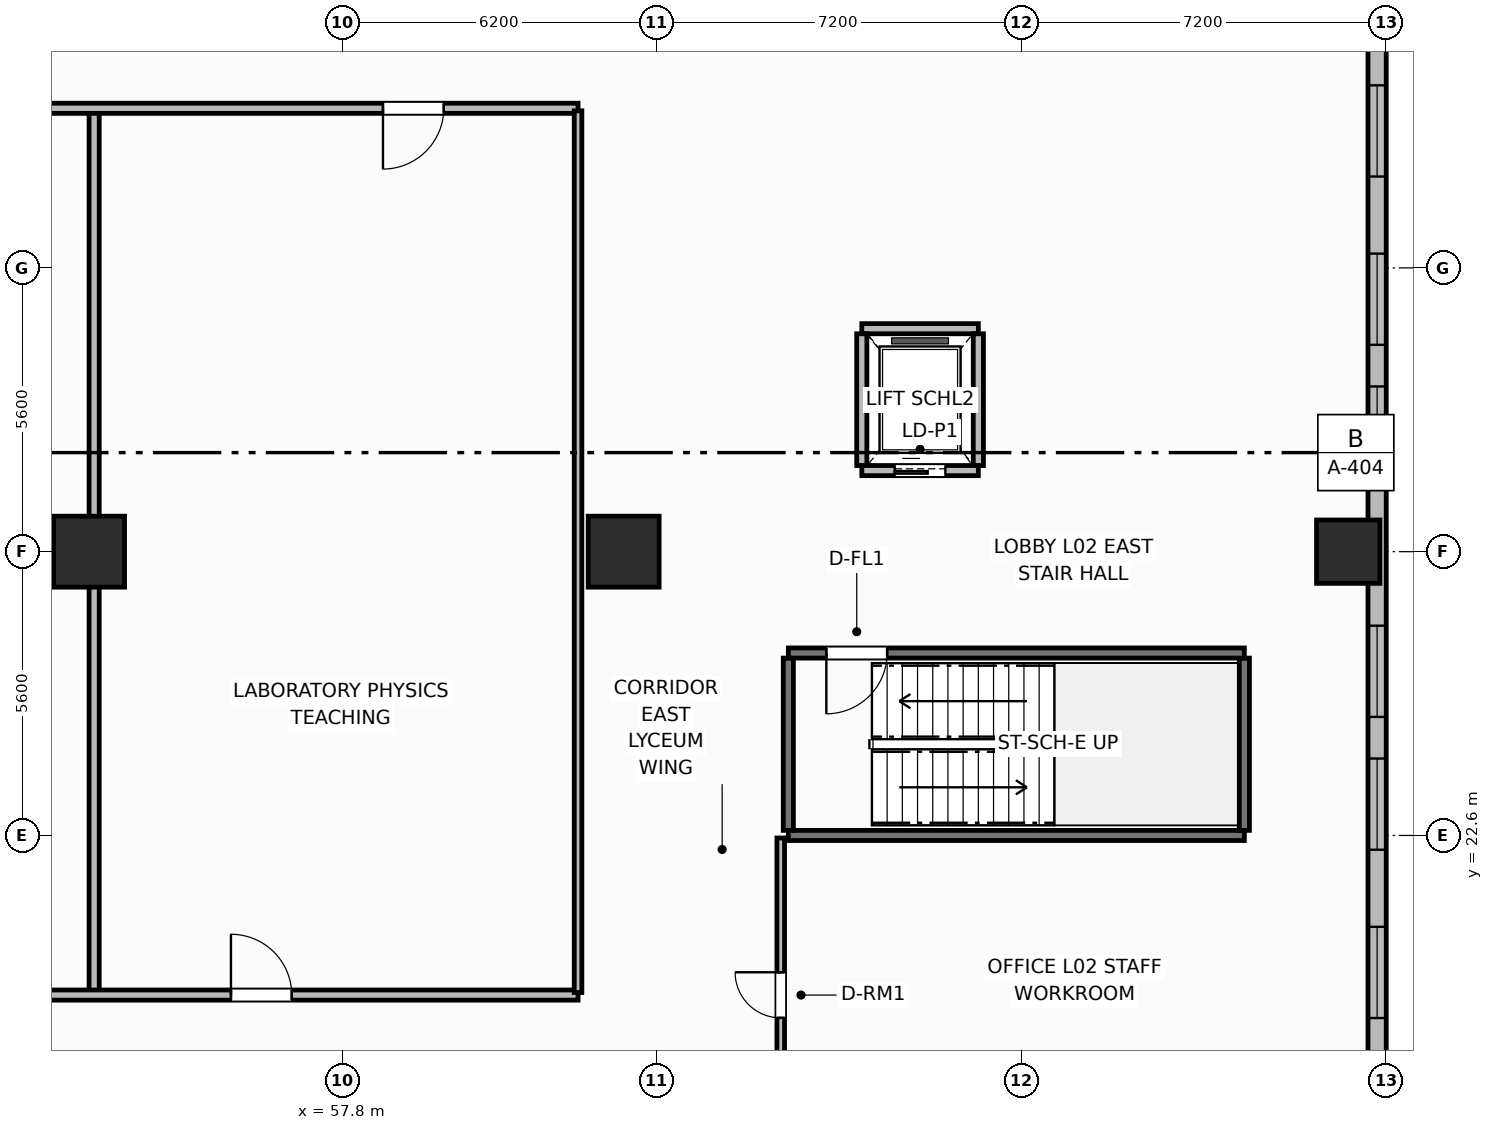
"""IFC4 building model, lengths in metres.
Left out: names, types, materials, properties, quantities, classifications, styles, units other than length and angle.
Written with IfcOpenShell. Run it as: python <this file> out.ifc"""

import sys

from ifc_helpers import new_model, si_unit, direction, frame, frame_2d, origin, origin_2d, place, context, subcontext, project, spatial, rectangle, extrude, element, fill, save


model = new_model("IFC4")
c1 = context("Model", 3, precision=1e-05, world=origin(), true_north=direction((0.0, 1.0)))
c2 = subcontext(c1, "Body", "Model", "MODEL_VIEW")
j1 = project(units=[si_unit("LENGTHUNIT", "METRE"), si_unit("PLANEANGLEUNIT", "RADIAN")], contexts=[c1])
p1 = place(None, origin())
s1 = spatial("IfcSite", under=j1, at=p1, CompositionType="ELEMENT")
p2 = place(p1, origin())
s2 = spatial("IfcBuilding", under=s1, at=p2, CompositionType="ELEMENT")
p3 = place(p2, frame((0.0, 0.0, 11.1)))
s3 = spatial("IfcBuildingStorey", under=s2, at=p3, CompositionType="ELEMENT", Elevation=11.1)
p4 = place(p3, frame((52.8, 28.2, 0.0), z_axis=(0.0, 0.0, 1.0), x_axis=(1.0, 0.0, 0.0)))
e1 = element("IfcColumn", 1, at=p4, inside=s3, PredefinedType="COLUMN", context=c2, shape_type="SweptSolid", body=[
    extrude(rectangle(XDim=1.4, YDim=1.4, at=origin_2d()), origin(), (0.0, 0.0, 1.0), 4.5),
])
p5 = place(p3, frame((77.65, 28.2, 0.0), z_axis=(0.0, 0.0, 1.0), x_axis=(1.0, 0.0, 0.0)))
e2 = element("IfcColumn", 2, at=p5, inside=s3, PredefinedType="COLUMN", context=c2, shape_type="SweptSolid", body=[
    extrude(rectangle(XDim=1.25, YDim=1.25, at=origin_2d()), origin(), (0.0, 0.0, 1.0), 4.5),
])
p6 = place(p3, frame((63.35, 28.2, 0.0), z_axis=(0.0, 0.0, 1.0), x_axis=(1.0, 0.0, 0.0)))
e3 = element("IfcColumn", 3, at=p6, inside=s3, PredefinedType="COLUMN", context=c2, shape_type="SweptSolid", body=[
    extrude(rectangle(XDim=1.4, YDim=1.4, at=origin_2d()), origin(), (0.0, 0.0, 1.0), 4.5),
])
p7 = place(p3, frame((78.22, 0.98, 0.0), z_axis=(0.0, 0.0, 1.0), x_axis=(0.0, 1.0, 0.0)))
e4 = element("IfcWall", 4, at=p7, inside=s3, PredefinedType="SOLIDWALL", context=c2, shape_type="SweptSolid", body=[
    extrude(rectangle(XDim=54.44, YDim=0.36, at=frame_2d((27.22, 0.0))), origin(), (0.0, 0.0, 1.0), 3.48),
])
p8 = place(p7, frame((1.411, 0.0, 0.9)))
e5 = element("IfcOpeningElement", 5, at=p8, cuts=e4, PredefinedType="OPENING", context=c2, shape_type="SweptSolid", body=[
    extrude(rectangle(XDim=1.8, YDim=2.1, at=frame_2d((0.9, 1.05))), frame((0.0, 0.19, 0.0), z_axis=(0.0, -1.0, 0.0), x_axis=(1.0, 0.0, 0.0)), (0.0, 0.0, 1.0), 0.38),
])
p9 = place(p7, frame((4.732, 0.0, 0.9)))
e6 = element("IfcOpeningElement", 6, at=p9, cuts=e4, PredefinedType="OPENING", context=c2, shape_type="SweptSolid", body=[
    extrude(rectangle(XDim=1.8, YDim=2.1, at=frame_2d((0.9, 1.05))), frame((0.0, 0.19, 0.0), z_axis=(0.0, -1.0, 0.0), x_axis=(1.0, 0.0, 0.0)), (0.0, 0.0, 1.0), 0.38),
])
p10 = place(p7, frame((11.375, 0.0, 0.9)))
e7 = element("IfcOpeningElement", 7, at=p10, cuts=e4, PredefinedType="OPENING", context=c2, shape_type="SweptSolid", body=[
    extrude(rectangle(XDim=1.8, YDim=2.1, at=frame_2d((0.9, 1.05))), frame((0.0, 0.19, 0.0), z_axis=(0.0, -1.0, 0.0), x_axis=(1.0, 0.0, 0.0)), (0.0, 0.0, 1.0), 0.38),
])
p11 = place(p7, frame((18.017, 0.0, 0.9)))
e8 = element("IfcOpeningElement", 8, at=p11, cuts=e4, PredefinedType="OPENING", context=c2, shape_type="SweptSolid", body=[
    extrude(rectangle(XDim=1.8, YDim=2.1, at=frame_2d((0.9, 1.05))), frame((0.0, 0.19, 0.0), z_axis=(0.0, -1.0, 0.0), x_axis=(1.0, 0.0, 0.0)), (0.0, 0.0, 1.0), 0.38),
])
p12 = place(p7, frame((21.338, 0.0, 0.9)))
e9 = element("IfcOpeningElement", 9, at=p12, cuts=e4, PredefinedType="OPENING", context=c2, shape_type="SweptSolid", body=[
    extrude(rectangle(XDim=1.8, YDim=2.1, at=frame_2d((0.9, 1.05))), frame((0.0, 0.19, 0.0), z_axis=(0.0, -1.0, 0.0), x_axis=(1.0, 0.0, 0.0)), (0.0, 0.0, 1.0), 0.38),
])
p13 = place(p7, frame((23.959, 0.0, 0.9)))
e10 = element("IfcOpeningElement", 10, at=p13, cuts=e4, PredefinedType="OPENING", context=c2, shape_type="SweptSolid", body=[
    extrude(rectangle(XDim=1.8, YDim=2.1, at=frame_2d((0.9, 1.05))), frame((0.0, 0.19, 0.0), z_axis=(0.0, -1.0, 0.0), x_axis=(1.0, 0.0, 0.0)), (0.0, 0.0, 1.0), 0.38),
])
p14 = place(p7, frame((28.681, 0.0, 0.9)))
e11 = element("IfcOpeningElement", 11, at=p14, cuts=e4, PredefinedType="OPENING", context=c2, shape_type="SweptSolid", body=[
    extrude(rectangle(XDim=1.8, YDim=2.1, at=frame_2d((0.9, 1.05))), frame((0.0, 0.19, 0.0), z_axis=(0.0, -1.0, 0.0), x_axis=(1.0, 0.0, 0.0)), (0.0, 0.0, 1.0), 0.38),
])
p15 = place(p7, frame((31.302, 0.0, 0.9)))
e12 = element("IfcOpeningElement", 12, at=p15, cuts=e4, PredefinedType="OPENING", context=c2, shape_type="SweptSolid", body=[
    extrude(rectangle(XDim=1.8, YDim=2.1, at=frame_2d((0.9, 1.05))), frame((0.0, 0.19, 0.0), z_axis=(0.0, -1.0, 0.0), x_axis=(1.0, 0.0, 0.0)), (0.0, 0.0, 1.0), 0.38),
])
p16 = place(p7, frame((34.623, 0.0, 0.9)))
e13 = element("IfcOpeningElement", 13, at=p16, cuts=e4, PredefinedType="OPENING", context=c2, shape_type="SweptSolid", body=[
    extrude(rectangle(XDim=1.8, YDim=2.1, at=frame_2d((0.9, 1.05))), frame((0.0, 0.19, 0.0), z_axis=(0.0, -1.0, 0.0), x_axis=(1.0, 0.0, 0.0)), (0.0, 0.0, 1.0), 0.38),
])
p17 = place(p7, frame((41.266, 0.0, 0.9)))
e14 = element("IfcOpeningElement", 14, at=p17, cuts=e4, PredefinedType="OPENING", context=c2, shape_type="SweptSolid", body=[
    extrude(rectangle(XDim=1.8, YDim=2.1, at=frame_2d((0.9, 1.05))), frame((0.0, 0.19, 0.0), z_axis=(0.0, -1.0, 0.0), x_axis=(1.0, 0.0, 0.0)), (0.0, 0.0, 1.0), 0.38),
])
p18 = place(p7, frame((47.908, 0.0, 0.9)))
e15 = element("IfcOpeningElement", 15, at=p18, cuts=e4, PredefinedType="OPENING", context=c2, shape_type="SweptSolid", body=[
    extrude(rectangle(XDim=1.8, YDim=2.1, at=frame_2d((0.9, 1.05))), frame((0.0, 0.19, 0.0), z_axis=(0.0, -1.0, 0.0), x_axis=(1.0, 0.0, 0.0)), (0.0, 0.0, 1.0), 0.38),
])
p19 = place(p7, frame((51.229, 0.0, 0.9)))
e16 = element("IfcOpeningElement", 16, at=p19, cuts=e4, PredefinedType="OPENING", context=c2, shape_type="SweptSolid", body=[
    extrude(rectangle(XDim=1.8, YDim=2.1, at=frame_2d((0.9, 1.05))), frame((0.0, 0.19, 0.0), z_axis=(0.0, -1.0, 0.0), x_axis=(1.0, 0.0, 0.0)), (0.0, 0.0, 1.0), 0.38),
])
p20 = place(p3, frame((66.6, 22.6, 0.0), z_axis=(0.0, 0.0, 1.0), x_axis=(1.0, 0.0, 0.0)))
e17 = element("IfcWall", 17, at=p20, inside=s3, PredefinedType="SHEAR", context=c2, shape_type="SweptSolid", body=[
    extrude(rectangle(XDim=9.0, YDim=0.2, at=frame_2d((4.5, 0.0))), origin(), (0.0, 0.0, 1.0), 4.5),
])
for number, where, z_axis, x_axis in (
    (18, (66.6, 22.7, 0.0), (0.0, 0.0, 1.0), (0.0, 1.0, 0.0)),
    (19, (75.6, 22.7, 0.0), (0.0, 0.0, 1.0), (0.0, 1.0, 0.0)),
):
    element("IfcWall", number, at=place(p3, frame(where, z_axis=z_axis, x_axis=x_axis)), inside=s3, PredefinedType="SHEAR", context=c2, shape_type="SweptSolid", body=[
        extrude(rectangle(XDim=3.4, YDim=0.2, at=frame_2d((1.7, 0.0))), origin(), (0.0, 0.0, 1.0), 4.5),
    ])
p21 = place(p3, frame((75.6, 26.2, 0.0), z_axis=(0.0, 0.0, 1.0), x_axis=(-1.0, 0.0, 0.0)))
e20 = element("IfcWall", 20, at=p21, inside=s3, PredefinedType="SHEAR", context=c2, shape_type="SweptSolid", body=[
    extrude(rectangle(XDim=9.0, YDim=0.2, at=frame_2d((4.5, 0.0))), origin(), (0.0, 0.0, 1.0), 4.5),
])
p22 = place(p21, frame((7.05, 0.0, 0.0)))
e21 = element("IfcOpeningElement", 21, at=p22, cuts=e20, PredefinedType="OPENING", context=c2, shape_type="SweptSolid", body=[
    extrude(rectangle(XDim=1.2, YDim=2.15, at=frame_2d((0.6, 1.075))), frame((0.0, 0.11, 0.0), z_axis=(0.0, -1.0, 0.0), x_axis=(1.0, 0.0, 0.0)), (0.0, 0.0, 1.0), 0.22),
])
p23 = place(p3, frame((68.05, 32.6, 0.0), z_axis=(0.0, 0.0, 1.0), x_axis=(1.0, 0.0, 0.0)))
e22 = element("IfcWall", 22, at=p23, inside=s3, PredefinedType="PARTITIONING", context=c2, shape_type="SweptSolid", body=[
    extrude(rectangle(XDim=2.3, YDim=0.2, at=frame_2d((1.15, 0.0))), origin(), (0.0, 0.0, 1.0), 3.42),
])
for number, where, z_axis, x_axis in (
    (23, (68.05, 29.9, 0.0), (0.0, 0.0, 1.0), (0.0, 1.0, 0.0)),
    (24, (70.35, 29.9, 0.0), (0.0, 0.0, 1.0), (0.0, 1.0, 0.0)),
):
    element("IfcWall", number, at=place(p3, frame(where, z_axis=z_axis, x_axis=x_axis)), inside=s3, PredefinedType="PARTITIONING", context=c2, shape_type="SweptSolid", body=[
        extrude(rectangle(XDim=2.6, YDim=0.2, at=frame_2d((1.3, 0.0))), origin(), (0.0, 0.0, 1.0), 3.42),
    ])
p24 = place(p3, frame((68.05, 29.8, 0.0), z_axis=(0.0, 0.0, 1.0), x_axis=(1.0, 0.0, 0.0)))
e25 = element("IfcWall", 25, at=p24, inside=s3, PredefinedType="PARTITIONING", context=c2, shape_type="SweptSolid", body=[
    extrude(rectangle(XDim=2.3, YDim=0.2, at=frame_2d((1.15, 0.0))), origin(), (0.0, 0.0, 1.0), 3.42),
])
p25 = place(p24, frame((0.65, 0.0, 0.0)))
e26 = element("IfcOpeningElement", 26, at=p25, cuts=e25, PredefinedType="OPENING", context=c2, shape_type="SweptSolid", body=[
    extrude(rectangle(XDim=1.0, YDim=2.15, at=frame_2d((0.5, 1.075))), frame((0.0, 0.11, 0.0), z_axis=(0.0, -1.0, 0.0), x_axis=(1.0, 0.0, 0.0)), (0.0, 0.0, 1.0), 0.22),
])
p26 = place(p3, frame((52.9, 19.5, 0.0), z_axis=(0.0, 0.0, 1.0), x_axis=(0.0, 1.0, 0.0)))
e27 = element("IfcWall", 27, at=p26, inside=s3, PredefinedType="PARTITIONING", context=c2, shape_type="SweptSolid", body=[
    extrude(rectangle(XDim=17.4, YDim=0.2, at=frame_2d((8.7, 0.0))), origin(), (0.0, 0.0, 1.0), 3.42),
])
p27 = place(p3, frame((15.95, 19.45, 0.0), z_axis=(0.0, 0.0, 1.0), x_axis=(1.0, 0.0, 0.0)))
e28 = element("IfcWall", 28, at=p27, inside=s3, PredefinedType="PARTITIONING", context=c2, shape_type="SweptSolid", body=[
    extrude(rectangle(XDim=46.5, YDim=0.2, at=frame_2d((23.25, 0.0))), origin(), (0.0, 0.0, 1.0), 3.42),
])
p28 = place(p27, frame((2.65, 0.0, 0.0)))
e29 = element("IfcOpeningElement", 29, at=p28, cuts=e28, PredefinedType="OPENING", context=c2, shape_type="SweptSolid", body=[
    extrude(rectangle(XDim=1.2, YDim=2.15, at=frame_2d((0.6, 1.075))), frame((0.0, 0.11, 0.0), z_axis=(0.0, -1.0, 0.0), x_axis=(1.0, 0.0, 0.0)), (0.0, 0.0, 1.0), 0.22),
])
p29 = place(p27, frame((28.65, 0.0, 0.0)))
e30 = element("IfcOpeningElement", 30, at=p29, cuts=e28, PredefinedType="OPENING", context=c2, shape_type="SweptSolid", body=[
    extrude(rectangle(XDim=1.2, YDim=2.15, at=frame_2d((0.6, 1.075))), frame((0.0, 0.11, 0.0), z_axis=(0.0, -1.0, 0.0), x_axis=(1.0, 0.0, 0.0)), (0.0, 0.0, 1.0), 0.22),
])
p30 = place(p27, frame((39.65, 0.0, 0.0)))
e31 = element("IfcOpeningElement", 31, at=p30, cuts=e28, PredefinedType="OPENING", context=c2, shape_type="SweptSolid", body=[
    extrude(rectangle(XDim=1.2, YDim=2.15, at=frame_2d((0.6, 1.075))), frame((0.0, 0.11, 0.0), z_axis=(0.0, -1.0, 0.0), x_axis=(1.0, 0.0, 0.0)), (0.0, 0.0, 1.0), 0.22),
])
p31 = place(p3, frame((62.45, 36.95, 0.0), z_axis=(0.0, 0.0, 1.0), x_axis=(-1.0, 0.0, 0.0)))
e32 = element("IfcWall", 32, at=p31, inside=s3, PredefinedType="PARTITIONING", context=c2, shape_type="SweptSolid", body=[
    extrude(rectangle(XDim=46.5, YDim=0.2, at=frame_2d((23.25, 0.0))), origin(), (0.0, 0.0, 1.0), 3.42),
])
p32 = place(p31, frame((23.25, 0.0, 0.0)))
e33 = element("IfcOpeningElement", 33, at=p32, cuts=e32, PredefinedType="OPENING", context=c2, shape_type="SweptSolid", body=[
    extrude(rectangle(XDim=1.2, YDim=2.15, at=frame_2d((0.6, 1.075))), frame((0.0, 0.11, 0.0), z_axis=(0.0, -1.0, 0.0), x_axis=(1.0, 0.0, 0.0)), (0.0, 0.0, 1.0), 0.22),
])
p33 = place(p31, frame((12.25, 0.0, 0.0)))
e34 = element("IfcOpeningElement", 34, at=p33, cuts=e32, PredefinedType="OPENING", context=c2, shape_type="SweptSolid", body=[
    extrude(rectangle(XDim=1.2, YDim=2.15, at=frame_2d((0.6, 1.075))), frame((0.0, 0.11, 0.0), z_axis=(0.0, -1.0, 0.0), x_axis=(1.0, 0.0, 0.0)), (0.0, 0.0, 1.0), 0.22),
])
p34 = place(p31, frame((2.65, 0.0, 0.0)))
e35 = element("IfcOpeningElement", 35, at=p34, cuts=e32, PredefinedType="OPENING", context=c2, shape_type="SweptSolid", body=[
    extrude(rectangle(XDim=1.2, YDim=2.15, at=frame_2d((0.6, 1.075))), frame((0.0, 0.11, 0.0), z_axis=(0.0, -1.0, 0.0), x_axis=(1.0, 0.0, 0.0)), (0.0, 0.0, 1.0), 0.22),
])
p35 = place(p3, frame((62.45, 19.5, 0.0), z_axis=(0.0, 0.0, 1.0), x_axis=(0.0, 1.0, 0.0)))
e36 = element("IfcWall", 36, at=p35, inside=s3, PredefinedType="PARTITIONING", context=c2, shape_type="SweptSolid", body=[
    extrude(rectangle(XDim=17.4, YDim=0.15, at=frame_2d((8.7, 0.0))), origin(), (0.0, 0.0, 1.0), 3.42),
])
p36 = place(p3, frame((66.45, 16.9, 0.0), z_axis=(0.0, 0.0, 1.0), x_axis=(0.0, 1.0, 0.0)))
e37 = element("IfcWall", 37, at=p36, inside=s3, PredefinedType="PARTITIONING", context=c2, shape_type="SweptSolid", body=[
    extrude(rectangle(XDim=5.65, YDim=0.15, at=frame_2d((2.825, 0.0))), origin(), (0.0, 0.0, 1.0), 3.42),
])
p37 = place(p36, frame((2.1, 0.0, 0.0)))
e38 = element("IfcOpeningElement", 38, at=p37, cuts=e37, PredefinedType="OPENING", context=c2, shape_type="SweptSolid", body=[
    extrude(rectangle(XDim=0.9, YDim=2.1, at=frame_2d((0.45, 1.05))), frame((0.0, 0.085, 0.0), z_axis=(0.0, -1.0, 0.0), x_axis=(1.0, 0.0, 0.0)), (0.0, 0.0, 1.0), 0.17),
])
p38 = place(p11, origin())
e39 = element("IfcWindow", 39, at=p38, inside=s3, PartitioningType="SINGLE_PANEL", PredefinedType="WINDOW", context=c2, shape_type="SweptSolid", body=[
    extrude(rectangle(XDim=1.8, YDim=2.1, at=frame_2d((0.9, 1.05))), frame((0.0, 0.03, 0.0), z_axis=(0.0, -1.0, 0.0), x_axis=(1.0, 0.0, 0.0)), (0.0, 0.0, 1.0), 0.06),
])
fill(e8, e39)
p39 = place(p12, origin())
e40 = element("IfcWindow", 40, at=p39, inside=s3, PartitioningType="SINGLE_PANEL", PredefinedType="WINDOW", context=c2, shape_type="SweptSolid", body=[
    extrude(rectangle(XDim=1.8, YDim=2.1, at=frame_2d((0.9, 1.05))), frame((0.0, 0.03, 0.0), z_axis=(0.0, -1.0, 0.0), x_axis=(1.0, 0.0, 0.0)), (0.0, 0.0, 1.0), 0.06),
])
fill(e9, e40)
p40 = place(p13, origin())
e41 = element("IfcWindow", 41, at=p40, inside=s3, PartitioningType="SINGLE_PANEL", PredefinedType="WINDOW", context=c2, shape_type="SweptSolid", body=[
    extrude(rectangle(XDim=1.8, YDim=2.1, at=frame_2d((0.9, 1.05))), frame((0.0, 0.03, 0.0), z_axis=(0.0, -1.0, 0.0), x_axis=(1.0, 0.0, 0.0)), (0.0, 0.0, 1.0), 0.06),
])
fill(e10, e41)
p41 = place(p14, origin())
e42 = element("IfcWindow", 42, at=p41, inside=s3, PartitioningType="SINGLE_PANEL", PredefinedType="WINDOW", context=c2, shape_type="SweptSolid", body=[
    extrude(rectangle(XDim=1.8, YDim=2.1, at=frame_2d((0.9, 1.05))), frame((0.0, 0.03, 0.0), z_axis=(0.0, -1.0, 0.0), x_axis=(1.0, 0.0, 0.0)), (0.0, 0.0, 1.0), 0.06),
])
fill(e11, e42)
p42 = place(p15, origin())
e43 = element("IfcWindow", 43, at=p42, inside=s3, PartitioningType="SINGLE_PANEL", PredefinedType="WINDOW", context=c2, shape_type="SweptSolid", body=[
    extrude(rectangle(XDim=1.8, YDim=2.1, at=frame_2d((0.9, 1.05))), frame((0.0, 0.03, 0.0), z_axis=(0.0, -1.0, 0.0), x_axis=(1.0, 0.0, 0.0)), (0.0, 0.0, 1.0), 0.06),
])
fill(e12, e43)
p43 = place(p16, origin())
e44 = element("IfcWindow", 44, at=p43, inside=s3, PartitioningType="SINGLE_PANEL", PredefinedType="WINDOW", context=c2, shape_type="SweptSolid", body=[
    extrude(rectangle(XDim=1.8, YDim=2.1, at=frame_2d((0.9, 1.05))), frame((0.0, 0.03, 0.0), z_axis=(0.0, -1.0, 0.0), x_axis=(1.0, 0.0, 0.0)), (0.0, 0.0, 1.0), 0.06),
])
fill(e13, e44)
p44 = place(p22, origin())
e45 = element("IfcDoor", 45, at=p44, inside=s3, OperationType="SINGLE_SWING_RIGHT", PredefinedType="DOOR", context=c2, shape_type="SweptSolid", body=[
    extrude(rectangle(XDim=1.2, YDim=2.15, at=frame_2d((0.6, 1.075))), frame((0.0, 0.025, 0.0), z_axis=(0.0, -1.0, 0.0), x_axis=(1.0, 0.0, 0.0)), (0.0, 0.0, 1.0), 0.05),
])
fill(e21, e45)
p45 = place(p25, origin())
e46 = element("IfcDoor", 46, at=p45, inside=s3, OperationType="SLIDING_TO_LEFT", PredefinedType="DOOR", context=c2, shape_type="SweptSolid", body=[
    extrude(rectangle(XDim=1.0, YDim=2.15, at=frame_2d((0.5, 1.075))), frame((0.0, 0.025, 0.0), z_axis=(0.0, -1.0, 0.0), x_axis=(1.0, 0.0, 0.0)), (0.0, 0.0, 1.0), 0.05),
])
fill(e26, e46)
p46 = place(p30, origin())
e47 = element("IfcDoor", 47, at=p46, inside=s3, OperationType="SINGLE_SWING_LEFT", PredefinedType="DOOR", context=c2, shape_type="SweptSolid", body=[
    extrude(rectangle(XDim=1.2, YDim=2.15, at=frame_2d((0.6, 1.075))), frame((0.0, 0.025, 0.0), z_axis=(0.0, -1.0, 0.0), x_axis=(1.0, 0.0, 0.0)), (0.0, 0.0, 1.0), 0.05),
])
fill(e31, e47)
p47 = place(p34, origin())
e48 = element("IfcDoor", 48, at=p47, inside=s3, OperationType="SINGLE_SWING_RIGHT", PredefinedType="DOOR", context=c2, shape_type="SweptSolid", body=[
    extrude(rectangle(XDim=1.2, YDim=2.15, at=frame_2d((0.6, 1.075))), frame((0.0, 0.025, 0.0), z_axis=(0.0, -1.0, 0.0), x_axis=(1.0, 0.0, 0.0)), (0.0, 0.0, 1.0), 0.05),
])
fill(e35, e48)
p48 = place(p37, origin())
e49 = element("IfcDoor", 49, at=p48, inside=s3, OperationType="SINGLE_SWING_RIGHT", PredefinedType="DOOR", context=c2, shape_type="SweptSolid", body=[
    extrude(rectangle(XDim=0.9, YDim=2.1, at=frame_2d((0.45, 1.05))), frame((0.0, 0.025, 0.0), z_axis=(0.0, -1.0, 0.0), x_axis=(1.0, 0.0, 0.0)), (0.0, 0.0, 1.0), 0.05),
])
fill(e38, e49)
save(model, sys.argv[1])
